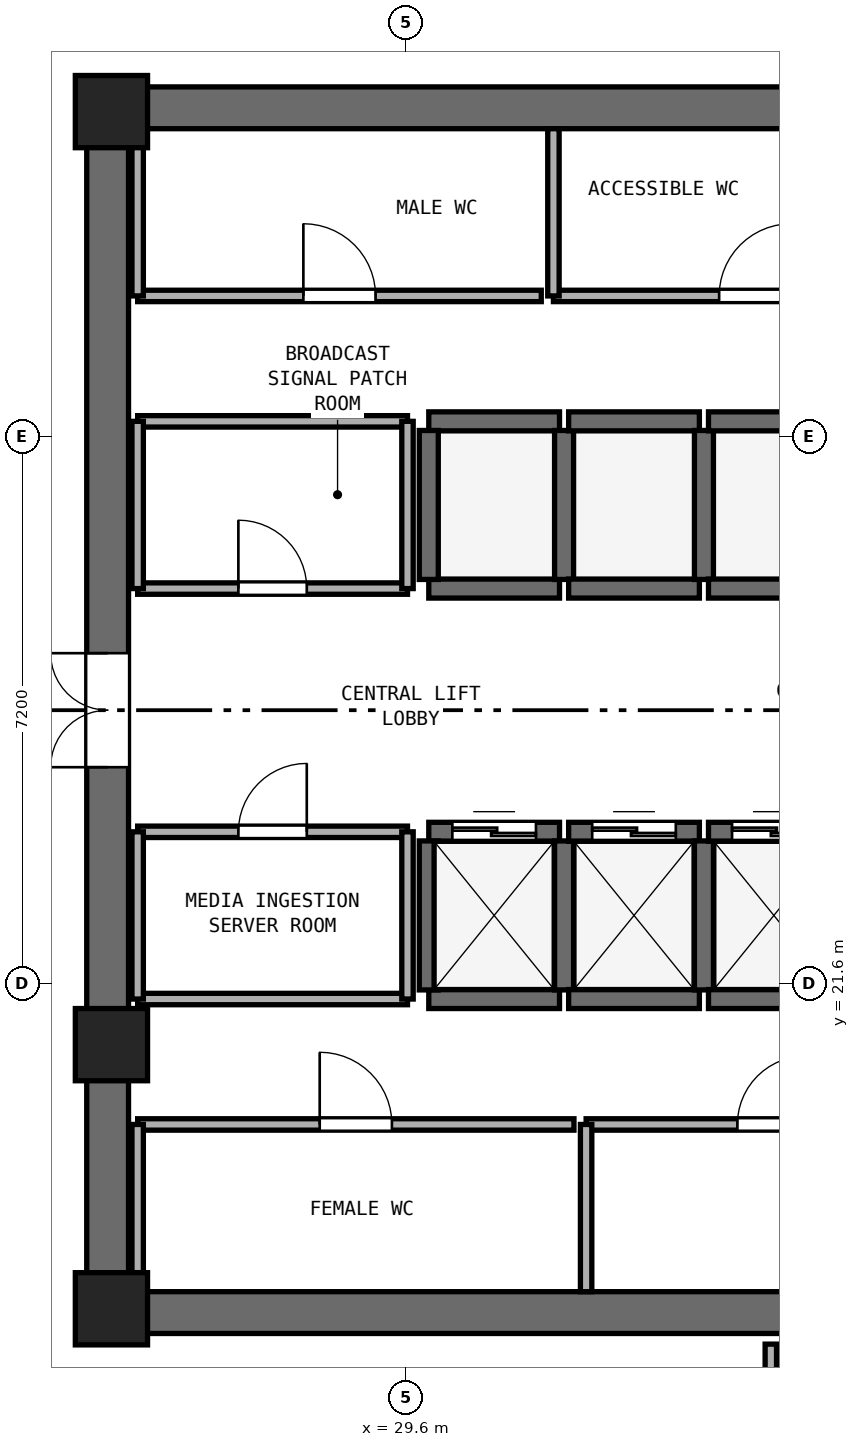
"""IFC4 building model, lengths in metres.
Left out: names, types, materials, properties, quantities, classifications, styles, units other than length and angle.
Written with IfcOpenShell. Run it as: python <this file> out.ifc"""

import sys

from ifc_helpers import new_model, si_unit, direction, frame, frame_2d, origin, origin_2d, place, context, subcontext, project, spatial, rectangle, extrude, element, fill, save


model = new_model("IFC4")
c1 = context("Model", 3, precision=1e-05, world=origin(), true_north=direction((0.0, 1.0)))
c2 = subcontext(c1, "Body", "Model", "MODEL_VIEW")
j1 = project(units=[si_unit("LENGTHUNIT", "METRE"), si_unit("PLANEANGLEUNIT", "RADIAN")], contexts=[c1])
p1 = place(None, origin())
s1 = spatial("IfcSite", under=j1, at=p1, CompositionType="ELEMENT")
p2 = place(p1, origin())
s2 = spatial("IfcBuilding", under=s1, at=p2, CompositionType="ELEMENT")
p3 = place(p2, frame((0.0, 0.0, 155.4)))
s3 = spatial("IfcBuildingStorey", under=s2, at=p3, CompositionType="ELEMENT", Elevation=155.4)
for number, where, z_axis, x_axis in (
    (1, (25.4, 17.275, 0.0), (0.0, 0.0, 1.0), (1.0, 0.0, 0.0)),
    (2, (25.4, 33.125, 0.0), (0.0, 0.0, 1.0), (1.0, 0.0, 0.0)),
):
    element("IfcWall", number, at=place(p3, frame(where, z_axis=z_axis, x_axis=x_axis)), inside=s3, PredefinedType="SHEAR", context=c2, shape_type="SweptSolid", body=[
        extrude(rectangle(XDim=23.2, YDim=0.55, at=frame_2d((11.6, 0.0))), origin(), (0.0, 0.0, 1.0), 3.54),
    ])
p4 = place(p3, frame((25.675, 17.55, 0.0), z_axis=(0.0, 0.0, 1.0), x_axis=(0.0, 1.0, 0.0)))
e3 = element("IfcWall", 3, at=p4, inside=s3, PredefinedType="SHEAR", context=c2, shape_type="SweptSolid", body=[
    extrude(rectangle(XDim=15.3, YDim=0.55, at=frame_2d((7.65, 0.0))), origin(), (0.0, 0.0, 1.0), 3.54),
])
p5 = place(p4, frame((6.9, 0.0, 0.0)))
e4 = element("IfcOpeningElement", 4, at=p5, cuts=e3, PredefinedType="OPENING", context=c2, shape_type="SweptSolid", body=[
    extrude(rectangle(XDim=1.5, YDim=2.15, at=frame_2d((0.75, 1.075))), frame((0.0, 0.285, 0.0), z_axis=(0.0, -1.0, 0.0), x_axis=(1.0, 0.0, 0.0)), (0.0, 0.0, 1.0), 0.57),
])
for number, where, z_axis, x_axis in (
    (5, (25.725, 17.325, 0.0), (0.0, 0.0, 1.0), (1.0, 0.0, 0.0)),
    (6, (25.725, 33.075, 0.0), (0.0, 0.0, 1.0), (1.0, 0.0, 0.0)),
    (7, (25.725, 20.8, 0.0), (0.0, 0.0, 1.0), (1.0, 0.0, 0.0)),
):
    element("IfcColumn", number, at=place(p3, frame(where, z_axis=z_axis, x_axis=x_axis)), inside=s3, PredefinedType="PILASTER", context=c2, shape_type="SweptSolid", body=[
        extrude(rectangle(XDim=0.95, YDim=0.95, at=origin_2d()), origin(), (0.0, 0.0, 1.0), 3.8),
    ])
p6 = place(p3, frame((29.9, 21.4, 0.0), z_axis=(0.0, 0.0, 1.0), x_axis=(1.0, 0.0, 0.0)))
e8 = element("IfcWall", 8, at=p6, inside=s3, PredefinedType="SHEAR", context=c2, shape_type="SweptSolid", body=[
    extrude(rectangle(XDim=1.72, YDim=0.25, at=frame_2d((0.86, 0.0))), origin(), (0.0, 0.0, 1.0), 3.54),
])
p7 = place(p3, frame((29.9, 23.6, 0.0), z_axis=(0.0, 0.0, 1.0), x_axis=(1.0, 0.0, 0.0)))
e9 = element("IfcWall", 9, at=p7, inside=s3, PredefinedType="SHEAR", context=c2, shape_type="SweptSolid", body=[
    extrude(rectangle(XDim=1.72, YDim=0.25, at=frame_2d((0.86, 0.0))), origin(), (0.0, 0.0, 1.0), 3.54),
])
p8 = place(p7, frame((0.31, 0.0, 0.0)))
e10 = element("IfcOpeningElement", 10, at=p8, cuts=e9, PredefinedType="OPENING", context=c2, shape_type="SweptSolid", body=[
    extrude(rectangle(XDim=1.1, YDim=2.15, at=frame_2d((0.55, 1.075))), frame((0.0, 0.135, 0.0), z_axis=(0.0, -1.0, 0.0), x_axis=(1.0, 0.0, 0.0)), (0.0, 0.0, 1.0), 0.27),
])
for number, where, z_axis, x_axis in (
    (11, (29.9, 21.52, 0.0), (0.0, 0.0, 1.0), (0.0, 1.0, 0.0)),
    (12, (31.68, 21.52, 0.0), (0.0, 0.0, 1.0), (0.0, 1.0, 0.0)),
):
    element("IfcWall", number, at=place(p3, frame(where, z_axis=z_axis, x_axis=x_axis)), inside=s3, PredefinedType="SHEAR", context=c2, shape_type="SweptSolid", body=[
        extrude(rectangle(XDim=1.96, YDim=0.25, at=frame_2d((0.98, 0.0))), origin(), (0.0, 0.0, 1.0), 3.54),
    ])
p9 = place(p3, frame((31.74, 21.4, 0.0), z_axis=(0.0, 0.0, 1.0), x_axis=(1.0, 0.0, 0.0)))
e13 = element("IfcWall", 13, at=p9, inside=s3, PredefinedType="SHEAR", context=c2, shape_type="SweptSolid", body=[
    extrude(rectangle(XDim=1.72, YDim=0.25, at=frame_2d((0.86, 0.0))), origin(), (0.0, 0.0, 1.0), 3.54),
])
p10 = place(p3, frame((31.74, 23.6, 0.0), z_axis=(0.0, 0.0, 1.0), x_axis=(1.0, 0.0, 0.0)))
e14 = element("IfcWall", 14, at=p10, inside=s3, PredefinedType="SHEAR", context=c2, shape_type="SweptSolid", body=[
    extrude(rectangle(XDim=1.72, YDim=0.25, at=frame_2d((0.86, 0.0))), origin(), (0.0, 0.0, 1.0), 3.54),
])
p11 = place(p10, frame((0.31, 0.0, 0.0)))
e15 = element("IfcOpeningElement", 15, at=p11, cuts=e14, PredefinedType="OPENING", context=c2, shape_type="SweptSolid", body=[
    extrude(rectangle(XDim=1.1, YDim=2.15, at=frame_2d((0.55, 1.075))), frame((0.0, 0.135, 0.0), z_axis=(0.0, -1.0, 0.0), x_axis=(1.0, 0.0, 0.0)), (0.0, 0.0, 1.0), 0.27),
])
p12 = place(p3, frame((33.52, 21.52, 0.0), z_axis=(0.0, 0.0, 1.0), x_axis=(0.0, 1.0, 0.0)))
e16 = element("IfcWall", 16, at=p12, inside=s3, PredefinedType="SHEAR", context=c2, shape_type="SweptSolid", body=[
    extrude(rectangle(XDim=1.96, YDim=0.25, at=frame_2d((0.98, 0.0))), origin(), (0.0, 0.0, 1.0), 3.54),
])
p13 = place(p3, frame((33.58, 21.4, 0.0), z_axis=(0.0, 0.0, 1.0), x_axis=(1.0, 0.0, 0.0)))
e17 = element("IfcWall", 17, at=p13, inside=s3, PredefinedType="SHEAR", context=c2, shape_type="SweptSolid", body=[
    extrude(rectangle(XDim=1.72, YDim=0.25, at=frame_2d((0.86, 0.0))), origin(), (0.0, 0.0, 1.0), 3.54),
])
p14 = place(p3, frame((33.58, 23.6, 0.0), z_axis=(0.0, 0.0, 1.0), x_axis=(1.0, 0.0, 0.0)))
e18 = element("IfcWall", 18, at=p14, inside=s3, PredefinedType="SHEAR", context=c2, shape_type="SweptSolid", body=[
    extrude(rectangle(XDim=1.72, YDim=0.25, at=frame_2d((0.86, 0.0))), origin(), (0.0, 0.0, 1.0), 3.54),
])
p15 = place(p14, frame((0.31, 0.0, 0.0)))
e19 = element("IfcOpeningElement", 19, at=p15, cuts=e18, PredefinedType="OPENING", context=c2, shape_type="SweptSolid", body=[
    extrude(rectangle(XDim=1.1, YDim=2.15, at=frame_2d((0.55, 1.075))), frame((0.0, 0.135, 0.0), z_axis=(0.0, -1.0, 0.0), x_axis=(1.0, 0.0, 0.0)), (0.0, 0.0, 1.0), 0.27),
])
for number, where, z_axis, x_axis in (
    (20, (29.9, 26.8, 0.0), (0.0, 0.0, 1.0), (1.0, 0.0, 0.0)),
    (21, (29.9, 29.0, 0.0), (0.0, 0.0, 1.0), (1.0, 0.0, 0.0)),
):
    element("IfcWall", number, at=place(p3, frame(where, z_axis=z_axis, x_axis=x_axis)), inside=s3, PredefinedType="SHEAR", context=c2, shape_type="SweptSolid", body=[
        extrude(rectangle(XDim=1.72, YDim=0.25, at=frame_2d((0.86, 0.0))), origin(), (0.0, 0.0, 1.0), 3.54),
    ])
for number, where, z_axis, x_axis in (
    (22, (29.9, 26.92, 0.0), (0.0, 0.0, 1.0), (0.0, 1.0, 0.0)),
    (23, (31.68, 26.92, 0.0), (0.0, 0.0, 1.0), (0.0, 1.0, 0.0)),
):
    element("IfcWall", number, at=place(p3, frame(where, z_axis=z_axis, x_axis=x_axis)), inside=s3, PredefinedType="SHEAR", context=c2, shape_type="SweptSolid", body=[
        extrude(rectangle(XDim=1.96, YDim=0.25, at=frame_2d((0.98, 0.0))), origin(), (0.0, 0.0, 1.0), 3.54),
    ])
for number, where, z_axis, x_axis in (
    (24, (31.74, 26.8, 0.0), (0.0, 0.0, 1.0), (1.0, 0.0, 0.0)),
    (25, (31.74, 29.0, 0.0), (0.0, 0.0, 1.0), (1.0, 0.0, 0.0)),
):
    element("IfcWall", number, at=place(p3, frame(where, z_axis=z_axis, x_axis=x_axis)), inside=s3, PredefinedType="SHEAR", context=c2, shape_type="SweptSolid", body=[
        extrude(rectangle(XDim=1.72, YDim=0.25, at=frame_2d((0.86, 0.0))), origin(), (0.0, 0.0, 1.0), 3.54),
    ])
p16 = place(p3, frame((33.52, 26.92, 0.0), z_axis=(0.0, 0.0, 1.0), x_axis=(0.0, 1.0, 0.0)))
e26 = element("IfcWall", 26, at=p16, inside=s3, PredefinedType="SHEAR", context=c2, shape_type="SweptSolid", body=[
    extrude(rectangle(XDim=1.96, YDim=0.25, at=frame_2d((0.98, 0.0))), origin(), (0.0, 0.0, 1.0), 3.54),
])
for number, where, z_axis, x_axis in (
    (27, (33.58, 26.8, 0.0), (0.0, 0.0, 1.0), (1.0, 0.0, 0.0)),
    (28, (33.58, 29.0, 0.0), (0.0, 0.0, 1.0), (1.0, 0.0, 0.0)),
):
    element("IfcWall", number, at=place(p3, frame(where, z_axis=z_axis, x_axis=x_axis)), inside=s3, PredefinedType="SHEAR", context=c2, shape_type="SweptSolid", body=[
        extrude(rectangle(XDim=1.72, YDim=0.25, at=frame_2d((0.86, 0.0))), origin(), (0.0, 0.0, 1.0), 3.54),
    ])
p17 = place(p3, frame((26.07, 30.65, 0.0), z_axis=(0.0, 0.0, 1.0), x_axis=(1.0, 0.0, 0.0)))
e29 = element("IfcWall", 29, at=p17, inside=s3, PredefinedType="PARTITIONING", context=c2, shape_type="SweptSolid", body=[
    extrude(rectangle(XDim=5.31, YDim=0.15, at=frame_2d((2.655, 0.0))), origin(), (0.0, 0.0, 1.0), 3.54),
])
p18 = place(p17, frame((2.18, 0.0, 0.0)))
e30 = element("IfcOpeningElement", 30, at=p18, cuts=e29, PredefinedType="OPENING", context=c2, shape_type="SweptSolid", body=[
    extrude(rectangle(XDim=0.95, YDim=2.1, at=frame_2d((0.475, 1.05))), frame((0.0, 0.085, 0.0), z_axis=(0.0, -1.0, 0.0), x_axis=(1.0, 0.0, 0.0)), (0.0, 0.0, 1.0), 0.17),
])
p19 = place(p3, frame((26.07, 30.65, 0.0), z_axis=(0.0, 0.0, 1.0), x_axis=(0.0, 1.0, 0.0)))
e31 = element("IfcWall", 31, at=p19, inside=s3, PredefinedType="PARTITIONING", context=c2, shape_type="SweptSolid", body=[
    extrude(rectangle(XDim=2.2, YDim=0.15, at=frame_2d((1.1, 0.0))), origin(), (0.0, 0.0, 1.0), 2.64),
])
p20 = place(p3, frame((31.54, 30.65, 0.0), z_axis=(0.0, 0.0, 1.0), x_axis=(1.0, 0.0, 0.0)))
e32 = element("IfcWall", 32, at=p20, inside=s3, PredefinedType="PARTITIONING", context=c2, shape_type="SweptSolid", body=[
    extrude(rectangle(XDim=5.31, YDim=0.15, at=frame_2d((2.655, 0.0))), origin(), (0.0, 0.0, 1.0), 3.54),
])
p21 = place(p20, frame((2.18, 0.0, 0.0)))
e33 = element("IfcOpeningElement", 33, at=p21, cuts=e32, PredefinedType="OPENING", context=c2, shape_type="SweptSolid", body=[
    extrude(rectangle(XDim=0.95, YDim=2.1, at=frame_2d((0.475, 1.05))), frame((0.0, 0.085, 0.0), z_axis=(0.0, -1.0, 0.0), x_axis=(1.0, 0.0, 0.0)), (0.0, 0.0, 1.0), 0.17),
])
p22 = place(p3, frame((31.54, 30.65, 0.0), z_axis=(0.0, 0.0, 1.0), x_axis=(0.0, 1.0, 0.0)))
e34 = element("IfcWall", 34, at=p22, inside=s3, PredefinedType="PARTITIONING", context=c2, shape_type="SweptSolid", body=[
    extrude(rectangle(XDim=2.2, YDim=0.15, at=frame_2d((1.1, 0.0))), origin(), (0.0, 0.0, 1.0), 3.54),
])
p23 = place(p3, frame((26.07, 19.75, 0.0), z_axis=(0.0, 0.0, 1.0), x_axis=(1.0, 0.0, 0.0)))
e35 = element("IfcWall", 35, at=p23, inside=s3, PredefinedType="PARTITIONING", context=c2, shape_type="SweptSolid", body=[
    extrude(rectangle(XDim=5.74, YDim=0.15, at=frame_2d((2.87, 0.0))), origin(), (0.0, 0.0, 1.0), 3.54),
])
p24 = place(p23, frame((2.395, 0.0, 0.0)))
e36 = element("IfcOpeningElement", 36, at=p24, cuts=e35, PredefinedType="OPENING", context=c2, shape_type="SweptSolid", body=[
    extrude(rectangle(XDim=0.95, YDim=2.1, at=frame_2d((0.475, 1.05))), frame((0.0, 0.085, 0.0), z_axis=(0.0, -1.0, 0.0), x_axis=(1.0, 0.0, 0.0)), (0.0, 0.0, 1.0), 0.17),
])
p25 = place(p3, frame((26.07, 17.55, 0.0), z_axis=(0.0, 0.0, 1.0), x_axis=(0.0, 1.0, 0.0)))
e37 = element("IfcWall", 37, at=p25, inside=s3, PredefinedType="PARTITIONING", context=c2, shape_type="SweptSolid", body=[
    extrude(rectangle(XDim=2.2, YDim=0.15, at=frame_2d((1.1, 0.0))), origin(), (0.0, 0.0, 1.0), 2.64),
])
p26 = place(p3, frame((31.97, 19.75, 0.0), z_axis=(0.0, 0.0, 1.0), x_axis=(1.0, 0.0, 0.0)))
e38 = element("IfcWall", 38, at=p26, inside=s3, PredefinedType="PARTITIONING", context=c2, shape_type="SweptSolid", body=[
    extrude(rectangle(XDim=4.88, YDim=0.15, at=frame_2d((2.44, 0.0))), origin(), (0.0, 0.0, 1.0), 3.54),
])
p27 = place(p26, frame((1.99, 0.0, 0.0)))
e39 = element("IfcOpeningElement", 39, at=p27, cuts=e38, PredefinedType="OPENING", context=c2, shape_type="SweptSolid", body=[
    extrude(rectangle(XDim=0.9, YDim=2.1, at=frame_2d((0.45, 1.05))), frame((0.0, 0.085, 0.0), z_axis=(0.0, -1.0, 0.0), x_axis=(1.0, 0.0, 0.0)), (0.0, 0.0, 1.0), 0.17),
])
p28 = place(p3, frame((31.97, 17.55, 0.0), z_axis=(0.0, 0.0, 1.0), x_axis=(0.0, 1.0, 0.0)))
e40 = element("IfcWall", 40, at=p28, inside=s3, PredefinedType="PARTITIONING", context=c2, shape_type="SweptSolid", body=[
    extrude(rectangle(XDim=2.2, YDim=0.15, at=frame_2d((1.1, 0.0))), origin(), (0.0, 0.0, 1.0), 3.54),
])
p29 = place(p3, frame((26.07, 26.8, 0.0), z_axis=(0.0, 0.0, 1.0), x_axis=(1.0, 0.0, 0.0)))
e41 = element("IfcWall", 41, at=p29, inside=s3, PredefinedType="PARTITIONING", context=c2, shape_type="SweptSolid", body=[
    extrude(rectangle(XDim=3.55, YDim=0.15, at=frame_2d((1.775, 0.0))), origin(), (0.0, 0.0, 1.0), 3.54),
])
p30 = place(p29, frame((1.325, 0.0, 0.0)))
e42 = element("IfcOpeningElement", 42, at=p30, cuts=e41, PredefinedType="OPENING", context=c2, shape_type="SweptSolid", body=[
    extrude(rectangle(XDim=0.9, YDim=2.1, at=frame_2d((0.45, 1.05))), frame((0.0, 0.085, 0.0), z_axis=(0.0, -1.0, 0.0), x_axis=(1.0, 0.0, 0.0)), (0.0, 0.0, 1.0), 0.17),
])
p31 = place(p3, frame((26.07, 29.0, 0.0), z_axis=(0.0, 0.0, 1.0), x_axis=(1.0, 0.0, 0.0)))
e43 = element("IfcWall", 43, at=p31, inside=s3, PredefinedType="PARTITIONING", context=c2, shape_type="SweptSolid", body=[
    extrude(rectangle(XDim=3.55, YDim=0.15, at=frame_2d((1.775, 0.0))), origin(), (0.0, 0.0, 1.0), 3.54),
])
p32 = place(p3, frame((26.07, 26.8, 0.0), z_axis=(0.0, 0.0, 1.0), x_axis=(0.0, 1.0, 0.0)))
e44 = element("IfcWall", 44, at=p32, inside=s3, PredefinedType="PARTITIONING", context=c2, shape_type="SweptSolid", body=[
    extrude(rectangle(XDim=2.2, YDim=0.15, at=frame_2d((1.1, 0.0))), origin(), (0.0, 0.0, 1.0), 2.64),
])
p33 = place(p3, frame((29.62, 26.8, 0.0), z_axis=(0.0, 0.0, 1.0), x_axis=(0.0, 1.0, 0.0)))
e45 = element("IfcWall", 45, at=p33, inside=s3, PredefinedType="PARTITIONING", context=c2, shape_type="SweptSolid", body=[
    extrude(rectangle(XDim=2.2, YDim=0.15, at=frame_2d((1.1, 0.0))), origin(), (0.0, 0.0, 1.0), 3.54),
])
p34 = place(p3, frame((26.07, 21.4, 0.0), z_axis=(0.0, 0.0, 1.0), x_axis=(1.0, 0.0, 0.0)))
e46 = element("IfcWall", 46, at=p34, inside=s3, PredefinedType="PARTITIONING", context=c2, shape_type="SweptSolid", body=[
    extrude(rectangle(XDim=3.55, YDim=0.15, at=frame_2d((1.775, 0.0))), origin(), (0.0, 0.0, 1.0), 3.54),
])
p35 = place(p3, frame((26.07, 23.6, 0.0), z_axis=(0.0, 0.0, 1.0), x_axis=(1.0, 0.0, 0.0)))
e47 = element("IfcWall", 47, at=p35, inside=s3, PredefinedType="PARTITIONING", context=c2, shape_type="SweptSolid", body=[
    extrude(rectangle(XDim=3.55, YDim=0.15, at=frame_2d((1.775, 0.0))), origin(), (0.0, 0.0, 1.0), 3.54),
])
p36 = place(p35, frame((1.325, 0.0, 0.0)))
e48 = element("IfcOpeningElement", 48, at=p36, cuts=e47, PredefinedType="OPENING", context=c2, shape_type="SweptSolid", body=[
    extrude(rectangle(XDim=0.9, YDim=2.1, at=frame_2d((0.45, 1.05))), frame((0.0, 0.085, 0.0), z_axis=(0.0, -1.0, 0.0), x_axis=(1.0, 0.0, 0.0)), (0.0, 0.0, 1.0), 0.17),
])
p37 = place(p3, frame((26.07, 21.4, 0.0), z_axis=(0.0, 0.0, 1.0), x_axis=(0.0, 1.0, 0.0)))
e49 = element("IfcWall", 49, at=p37, inside=s3, PredefinedType="PARTITIONING", context=c2, shape_type="SweptSolid", body=[
    extrude(rectangle(XDim=2.2, YDim=0.15, at=frame_2d((1.1, 0.0))), origin(), (0.0, 0.0, 1.0), 2.64),
])
p38 = place(p3, frame((29.62, 21.4, 0.0), z_axis=(0.0, 0.0, 1.0), x_axis=(0.0, 1.0, 0.0)))
e50 = element("IfcWall", 50, at=p38, inside=s3, PredefinedType="PARTITIONING", context=c2, shape_type="SweptSolid", body=[
    extrude(rectangle(XDim=2.2, YDim=0.15, at=frame_2d((1.1, 0.0))), origin(), (0.0, 0.0, 1.0), 3.54),
])
p39 = place(p3, frame((34.4, 15.35, 0.0), z_axis=(0.0, 0.0, 1.0), x_axis=(0.0, 1.0, 0.0)))
e51 = element("IfcWall", 51, at=p39, inside=s3, PredefinedType="PARTITIONING", context=c2, shape_type="SweptSolid", body=[
    extrude(rectangle(XDim=1.51, YDim=0.15, at=frame_2d((0.755, 0.0))), origin(), (0.0, 0.0, 1.0), 3.54),
])
p40 = place(p8, origin())
e52 = element("IfcDoor", 52, at=p40, inside=s3, OperationType="DOUBLE_DOOR_SLIDING", PredefinedType="DOOR", context=c2, shape_type="SweptSolid", body=[
    extrude(rectangle(XDim=1.1, YDim=2.15, at=frame_2d((0.55, 1.075))), frame((0.0, 0.025, 0.0), z_axis=(0.0, -1.0, 0.0), x_axis=(1.0, 0.0, 0.0)), (0.0, 0.0, 1.0), 0.05),
])
fill(e10, e52)
p41 = place(p11, origin())
e53 = element("IfcDoor", 53, at=p41, inside=s3, OperationType="DOUBLE_DOOR_SLIDING", PredefinedType="DOOR", context=c2, shape_type="SweptSolid", body=[
    extrude(rectangle(XDim=1.1, YDim=2.15, at=frame_2d((0.55, 1.075))), frame((0.0, 0.025, 0.0), z_axis=(0.0, -1.0, 0.0), x_axis=(1.0, 0.0, 0.0)), (0.0, 0.0, 1.0), 0.05),
])
fill(e15, e53)
p42 = place(p15, origin())
e54 = element("IfcDoor", 54, at=p42, inside=s3, OperationType="DOUBLE_DOOR_SLIDING", PredefinedType="DOOR", context=c2, shape_type="SweptSolid", body=[
    extrude(rectangle(XDim=1.1, YDim=2.15, at=frame_2d((0.55, 1.075))), frame((0.0, 0.025, 0.0), z_axis=(0.0, -1.0, 0.0), x_axis=(1.0, 0.0, 0.0)), (0.0, 0.0, 1.0), 0.05),
])
fill(e19, e54)
p43 = place(p5, origin())
e55 = element("IfcDoor", 55, at=p43, inside=s3, OperationType="DOUBLE_DOOR_SINGLE_SWING", PredefinedType="DOOR", context=c2, shape_type="SweptSolid", body=[
    extrude(rectangle(XDim=1.5, YDim=2.15, at=frame_2d((0.75, 1.075))), frame((0.0, 0.025, 0.0), z_axis=(0.0, -1.0, 0.0), x_axis=(1.0, 0.0, 0.0)), (0.0, 0.0, 1.0), 0.05),
])
fill(e4, e55)
p44 = place(p18, origin())
e56 = element("IfcDoor", 56, at=p44, inside=s3, OperationType="SINGLE_SWING_LEFT", PredefinedType="DOOR", context=c2, shape_type="SweptSolid", body=[
    extrude(rectangle(XDim=0.95, YDim=2.1, at=frame_2d((0.475, 1.05))), frame((0.0, 0.025, 0.0), z_axis=(0.0, -1.0, 0.0), x_axis=(1.0, 0.0, 0.0)), (0.0, 0.0, 1.0), 0.05),
])
fill(e30, e56)
p45 = place(p21, origin())
e57 = element("IfcDoor", 57, at=p45, inside=s3, OperationType="SINGLE_SWING_RIGHT", PredefinedType="DOOR", context=c2, shape_type="SweptSolid", body=[
    extrude(rectangle(XDim=0.95, YDim=2.1, at=frame_2d((0.475, 1.05))), frame((0.0, 0.025, 0.0), z_axis=(0.0, -1.0, 0.0), x_axis=(1.0, 0.0, 0.0)), (0.0, 0.0, 1.0), 0.05),
])
fill(e33, e57)
p46 = place(p24, origin())
e58 = element("IfcDoor", 58, at=p46, inside=s3, OperationType="SINGLE_SWING_LEFT", PredefinedType="DOOR", context=c2, shape_type="SweptSolid", body=[
    extrude(rectangle(XDim=0.95, YDim=2.1, at=frame_2d((0.475, 1.05))), frame((0.0, 0.025, 0.0), z_axis=(0.0, -1.0, 0.0), x_axis=(1.0, 0.0, 0.0)), (0.0, 0.0, 1.0), 0.05),
])
fill(e36, e58)
p47 = place(p27, origin())
e59 = element("IfcDoor", 59, at=p47, inside=s3, OperationType="SINGLE_SWING_RIGHT", PredefinedType="DOOR", context=c2, shape_type="SweptSolid", body=[
    extrude(rectangle(XDim=0.9, YDim=2.1, at=frame_2d((0.45, 1.05))), frame((0.0, 0.025, 0.0), z_axis=(0.0, -1.0, 0.0), x_axis=(1.0, 0.0, 0.0)), (0.0, 0.0, 1.0), 0.05),
])
fill(e39, e59)
p48 = place(p30, origin())
e60 = element("IfcDoor", 60, at=p48, inside=s3, OperationType="SINGLE_SWING_LEFT", PredefinedType="DOOR", context=c2, shape_type="SweptSolid", body=[
    extrude(rectangle(XDim=0.9, YDim=2.1, at=frame_2d((0.45, 1.05))), frame((0.0, 0.025, 0.0), z_axis=(0.0, -1.0, 0.0), x_axis=(1.0, 0.0, 0.0)), (0.0, 0.0, 1.0), 0.05),
])
fill(e42, e60)
p49 = place(p36, origin())
e61 = element("IfcDoor", 61, at=p49, inside=s3, OperationType="SINGLE_SWING_RIGHT", PredefinedType="DOOR", context=c2, shape_type="SweptSolid", body=[
    extrude(rectangle(XDim=0.9, YDim=2.1, at=frame_2d((0.45, 1.05))), frame((0.0, 0.025, 0.0), z_axis=(0.0, -1.0, 0.0), x_axis=(1.0, 0.0, 0.0)), (0.0, 0.0, 1.0), 0.05),
])
fill(e48, e61)
save(model, sys.argv[1])
